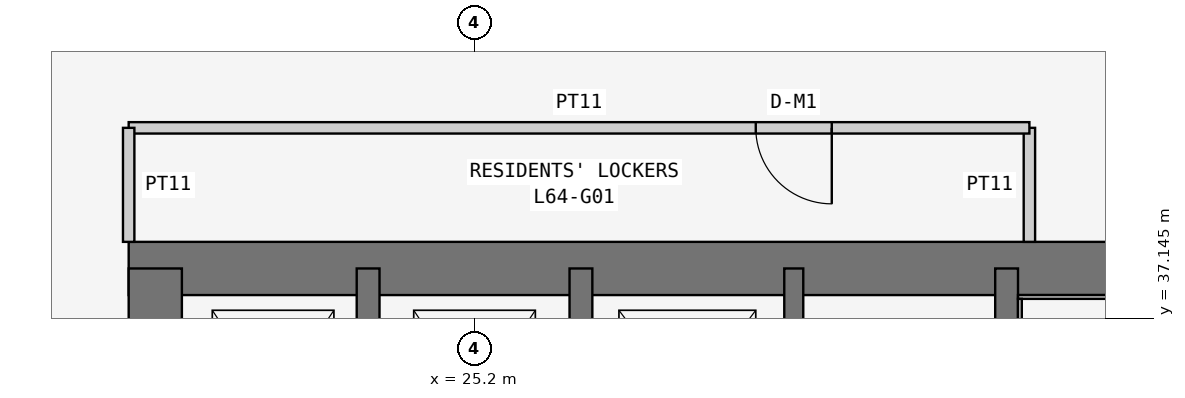
"""IFC4 building model, lengths in metres.
Left out: names, types, materials, properties, quantities, classifications, styles, units other than length and angle.
Written with IfcOpenShell. Run it as: python <this file> out.ifc"""

import sys

from ifc_helpers import new_model, si_unit, direction, frame, frame_2d, origin, place, context, subcontext, project, spatial, rectangle, extrude, element, fill, save


model = new_model("IFC4")
c1 = context("Model", 3, precision=1e-05, world=origin(), true_north=direction((0.0, 1.0)))
c2 = subcontext(c1, "Body", "Model", "MODEL_VIEW")
j1 = project(units=[si_unit("LENGTHUNIT", "METRE"), si_unit("PLANEANGLEUNIT", "RADIAN")], contexts=[c1])
p1 = place(None, origin())
s1 = spatial("IfcSite", under=j1, at=p1, CompositionType="ELEMENT")
p2 = place(p1, origin())
s2 = spatial("IfcBuilding", under=s1, at=p2, CompositionType="ELEMENT")
p3 = place(p2, frame((0.0, 0.0, 244.5)))
s3 = spatial("IfcBuildingStorey", under=s2, at=p3, CompositionType="ELEMENT", Elevation=244.5)
p4 = place(p3, frame((37.8, 37.8, 0.0), z_axis=(0.0, 0.0, 1.0), x_axis=(-1.0, 0.0, 0.0)))
e1 = element("IfcWall", 1, at=p4, inside=s3, PredefinedType="SHEAR", context=c2, shape_type="SweptSolid", body=[
    extrude(rectangle(XDim=17.15, YDim=0.7, at=frame_2d((8.575, 0.0))), origin(), (0.0, 0.0, 1.0), 3.6),
])
p5 = place(p3, frame((21.0, 37.8, 0.0), z_axis=(0.0, 0.0, 1.0), x_axis=(0.0, -1.0, 0.0)))
e2 = element("IfcWall", 2, at=p5, inside=s3, PredefinedType="SHEAR", context=c2, shape_type="SweptSolid", body=[
    extrude(rectangle(XDim=17.15, YDim=0.7, at=frame_2d((8.575, 0.0))), origin(), (0.0, 0.0, 1.0), 3.6),
])
p6 = place(p5, frame((5.4, 0.0, 0.0)))
e3 = element("IfcOpeningElement", 3, at=p6, cuts=e2, PredefinedType="OPENING", context=c2, shape_type="SweptSolid", body=[
    extrude(rectangle(XDim=1.2, YDim=2.1, at=frame_2d((0.6, 1.05))), frame((0.0, 0.36, 0.0), z_axis=(0.0, -1.0, 0.0), x_axis=(1.0, 0.0, 0.0)), (0.0, 0.0, 1.0), 0.72),
])
p7 = place(p3, frame((26.6, 21.0, 0.0), z_axis=(0.0, 0.0, 1.0), x_axis=(0.0, 1.0, 0.0)))
e4 = element("IfcWall", 4, at=p7, inside=s3, PredefinedType="SHEAR", context=c2, shape_type="SweptSolid", body=[
    extrude(rectangle(XDim=16.8, YDim=0.3, at=frame_2d((8.4, 0.0))), origin(), (0.0, 0.0, 1.0), 3.6),
])
p8 = place(p7, frame((10.4, 0.0, 0.0)))
e5 = element("IfcOpeningElement", 5, at=p8, cuts=e4, PredefinedType="OPENING", context=c2, shape_type="SweptSolid", body=[
    extrude(rectangle(XDim=1.2, YDim=2.1, at=frame_2d((0.6, 1.05))), frame((0.0, 0.16, 0.0), z_axis=(0.0, -1.0, 0.0), x_axis=(1.0, 0.0, 0.0)), (0.0, 0.0, 1.0), 0.32),
])
p9 = place(p3, frame((23.8, 34.6, 0.0), z_axis=(0.0, 0.0, 1.0), x_axis=(0.0, 1.0, 0.0)))
e6 = element("IfcWall", 6, at=p9, inside=s3, PredefinedType="SHEAR", context=c2, shape_type="SweptSolid", body=[
    extrude(rectangle(XDim=3.2, YDim=0.3, at=frame_2d((1.6, 0.0))), origin(), (0.0, 0.0, 1.0), 3.6),
])
p10 = place(p3, frame((32.2, 29.25, 0.0), z_axis=(0.0, 0.0, 1.0), x_axis=(0.0, 1.0, 0.0)))
e7 = element("IfcWall", 7, at=p10, inside=s3, PredefinedType="SHEAR", context=c2, shape_type="SweptSolid", body=[
    extrude(rectangle(XDim=8.55, YDim=0.3, at=frame_2d((4.275, 0.0))), origin(), (0.0, 0.0, 1.0), 3.6),
])
p11 = place(p3, frame((29.4, 34.6, 0.0), z_axis=(0.0, 0.0, 1.0), x_axis=(0.0, 1.0, 0.0)))
e8 = element("IfcWall", 8, at=p11, inside=s3, PredefinedType="SHEAR", context=c2, shape_type="SweptSolid", body=[
    extrude(rectangle(XDim=3.2, YDim=0.25, at=frame_2d((1.6, 0.0))), origin(), (0.0, 0.0, 1.0), 3.6),
])
p12 = place(p3, frame((32.5, 38.15, 0.0), z_axis=(0.0, 0.0, 1.0), x_axis=(0.0, 1.0, 0.0)))
e9 = element("IfcWall", 9, at=p12, inside=s3, PredefinedType="PARTITIONING", context=c2, shape_type="SweptSolid", body=[
    extrude(rectangle(XDim=1.5, YDim=0.15, at=frame_2d((0.75, 0.0))), origin(), (0.0, 0.0, 1.0), 3.35),
])
p13 = place(p3, frame((32.5, 39.65, 0.0), z_axis=(0.0, 0.0, 1.0), x_axis=(-1.0, 0.0, 0.0)))
e10 = element("IfcWall", 10, at=p13, inside=s3, PredefinedType="PARTITIONING", context=c2, shape_type="SweptSolid", body=[
    extrude(rectangle(XDim=11.85, YDim=0.15, at=frame_2d((5.925, 0.0))), origin(), (0.0, 0.0, 1.0), 3.35),
])
p14 = place(p13, frame((2.6, 0.0, 0.0)))
e11 = element("IfcOpeningElement", 11, at=p14, cuts=e10, PredefinedType="OPENING", context=c2, shape_type="SweptSolid", body=[
    extrude(rectangle(XDim=1.0, YDim=2.1, at=frame_2d((0.5, 1.05))), frame((0.0, 0.085, 0.0), z_axis=(0.0, -1.0, 0.0), x_axis=(1.0, 0.0, 0.0)), (0.0, 0.0, 1.0), 0.17),
])
p15 = place(p3, frame((20.65, 39.65, 0.0), z_axis=(0.0, 0.0, 1.0), x_axis=(0.0, -1.0, 0.0)))
e12 = element("IfcWall", 12, at=p15, inside=s3, PredefinedType="PARTITIONING", context=c2, shape_type="SweptSolid", body=[
    extrude(rectangle(XDim=1.5, YDim=0.15, at=frame_2d((0.75, 0.0))), origin(), (0.0, 0.0, 1.0), 3.35),
])
p16 = place(p3, frame((32.35, 37.425, 1.8), z_axis=(0.0, 0.0, 1.0), x_axis=(1.0, 0.0, 0.0)))
e13 = element("IfcWall", 13, at=p16, inside=s3, PredefinedType="PARTITIONING", context=c2, shape_type="SweptSolid", body=[
    extrude(rectangle(XDim=5.1, YDim=0.05, at=frame_2d((2.55, 0.0))), origin(), (0.0, 0.0, 1.0), 1.8),
])
p17 = place(p3, frame((32.375, 33.47, 1.8), z_axis=(0.0, 0.0, 1.0), x_axis=(0.0, 1.0, 0.0)))
e14 = element("IfcWall", 14, at=p17, inside=s3, PredefinedType="PARTITIONING", context=c2, shape_type="SweptSolid", body=[
    extrude(rectangle(XDim=3.93, YDim=0.05, at=frame_2d((1.965, 0.0))), origin(), (0.0, 0.0, 1.0), 1.8),
])
p18 = place(p14, origin())
e15 = element("IfcDoor", 15, at=p18, inside=s3, OperationType="SINGLE_SWING_LEFT", PredefinedType="DOOR", context=c2, shape_type="SweptSolid", body=[
    extrude(rectangle(XDim=1.0, YDim=2.1, at=frame_2d((0.5, 1.05))), frame((0.0, 0.025, 0.0), z_axis=(0.0, -1.0, 0.0), x_axis=(1.0, 0.0, 0.0)), (0.0, 0.0, 1.0), 0.05),
])
fill(e11, e15)
save(model, sys.argv[1])
